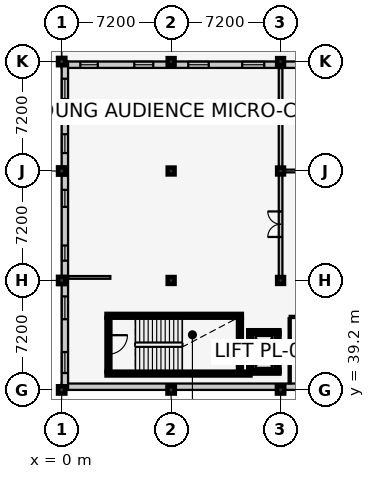
"""IFC4 building model, lengths in metres.
Left out: names, types, materials, properties, quantities, classifications, styles, units other than length and angle.
Written with IfcOpenShell. Run it as: python <this file> out.ifc"""

import sys

from ifc_helpers import new_model, si_unit, direction, frame, frame_2d, origin, origin_2d, place, context, subcontext, project, spatial, rectangle, extrude, element, fill, save


model = new_model("IFC4")
c1 = context("Model", 3, precision=1e-05, world=origin(), true_north=direction((0.0, 1.0)))
c2 = subcontext(c1, "Body", "Model", "MODEL_VIEW")
j1 = project(units=[si_unit("LENGTHUNIT", "METRE"), si_unit("PLANEANGLEUNIT", "RADIAN")], contexts=[c1])
p1 = place(None, origin())
s1 = spatial("IfcSite", under=j1, at=p1, CompositionType="ELEMENT")
p2 = place(p1, origin())
s2 = spatial("IfcBuilding", under=s1, at=p2, CompositionType="ELEMENT")
p3 = place(p2, frame((0.0, 0.0, 13.8)))
s3 = spatial("IfcBuildingStorey", under=s2, at=p3, CompositionType="ELEMENT", Elevation=13.8)
for number, where, z_axis, x_axis in (
    (1, (0.0, 39.2, 0.0), (0.0, 0.0, 1.0), (1.0, 0.0, 0.0)),
    (2, (0.0, 46.4, 0.0), (0.0, 0.0, 1.0), (1.0, 0.0, 0.0)),
    (3, (0.0, 53.6, 0.0), (0.0, 0.0, 1.0), (1.0, 0.0, 0.0)),
    (4, (0.0, 60.8, 0.0), (0.0, 0.0, 1.0), (1.0, 0.0, 0.0)),
    (5, (7.2, 39.2, 0.0), (0.0, 0.0, 1.0), (1.0, 0.0, 0.0)),
):
    element("IfcColumn", number, at=place(p3, frame(where, z_axis=z_axis, x_axis=x_axis)), inside=s3, PredefinedType="COLUMN", context=c2, shape_type="SweptSolid", body=[
        extrude(rectangle(XDim=0.48, YDim=0.48, at=origin_2d()), origin(), (0.0, 0.0, 1.0), 4.2),
    ])
for number, where, z_axis, x_axis in (
    (6, (7.2, 46.4, 0.0), (0.0, 0.0, 1.0), (1.0, 0.0, 0.0)),
    (7, (7.2, 53.6, 0.0), (0.0, 0.0, 1.0), (1.0, 0.0, 0.0)),
    (8, (7.2, 60.8, 0.0), (0.0, 0.0, 1.0), (1.0, 0.0, 0.0)),
):
    element("IfcColumn", number, at=place(p3, frame(where, z_axis=z_axis, x_axis=x_axis)), inside=s3, PredefinedType="COLUMN", context=c2, shape_type="SweptSolid", body=[
        extrude(rectangle(XDim=0.45, YDim=0.45, at=origin_2d()), origin(), (0.0, 0.0, 1.0), 4.2),
    ])
p4 = place(p3, frame((14.4, 39.2, 0.0), z_axis=(0.0, 0.0, 1.0), x_axis=(1.0, 0.0, 0.0)))
e9 = element("IfcColumn", 9, at=p4, inside=s3, PredefinedType="COLUMN", context=c2, shape_type="SweptSolid", body=[
    extrude(rectangle(XDim=0.48, YDim=0.48, at=origin_2d()), origin(), (0.0, 0.0, 1.0), 4.2),
])
for number, where, z_axis, x_axis in (
    (10, (14.4, 46.4, 0.0), (0.0, 0.0, 1.0), (1.0, 0.0, 0.0)),
    (11, (14.4, 53.6, 0.0), (0.0, 0.0, 1.0), (1.0, 0.0, 0.0)),
    (12, (14.4, 60.8, 0.0), (0.0, 0.0, 1.0), (1.0, 0.0, 0.0)),
):
    element("IfcColumn", number, at=place(p3, frame(where, z_axis=z_axis, x_axis=x_axis)), inside=s3, PredefinedType="COLUMN", context=c2, shape_type="SweptSolid", body=[
        extrude(rectangle(XDim=0.45, YDim=0.45, at=origin_2d()), origin(), (0.0, 0.0, 1.0), 4.2),
    ])
p5 = place(p3, frame((28.8, 39.41, 0.0), z_axis=(0.0, 0.0, 1.0), x_axis=(-1.0, 0.0, 0.0)))
e13 = element("IfcWall", 13, at=p5, inside=s3, PredefinedType="SOLIDWALL", context=c2, shape_type="SweptSolid", body=[
    extrude(rectangle(XDim=28.8, YDim=0.42, at=frame_2d((14.4, 0.0))), origin(), (0.0, 0.0, 1.0), 3.245),
])
p6 = place(p3, frame((0.0, 60.59, 0.0), z_axis=(0.0, 0.0, 1.0), x_axis=(1.0, 0.0, 0.0)))
e14 = element("IfcWall", 14, at=p6, inside=s3, PredefinedType="SOLIDWALL", context=c2, shape_type="SweptSolid", body=[
    extrude(rectangle(XDim=28.8, YDim=0.42, at=frame_2d((14.4, 0.0))), origin(), (0.0, 0.0, 1.0), 3.085),
])
p7 = place(p6, frame((1.225, 0.0, 0.9)))
e15 = element("IfcOpeningElement", 15, at=p7, cuts=e14, PredefinedType="OPENING", context=c2, shape_type="SweptSolid", body=[
    extrude(rectangle(XDim=1.15, YDim=1.45, at=frame_2d((0.575, 0.725))), frame((0.0, 0.222, 0.0), z_axis=(0.0, -1.0, 0.0), x_axis=(1.0, 0.0, 0.0)), (0.0, 0.0, 1.0), 0.444),
])
p8 = place(p6, frame((4.775, 0.0, 0.9)))
e16 = element("IfcOpeningElement", 16, at=p8, cuts=e14, PredefinedType="OPENING", context=c2, shape_type="SweptSolid", body=[
    extrude(rectangle(XDim=1.25, YDim=1.45, at=frame_2d((0.625, 0.725))), frame((0.0, 0.222, 0.0), z_axis=(0.0, -1.0, 0.0), x_axis=(1.0, 0.0, 0.0)), (0.0, 0.0, 1.0), 0.444),
])
p9 = place(p6, frame((8.325, 0.0, 0.9)))
e17 = element("IfcOpeningElement", 17, at=p9, cuts=e14, PredefinedType="OPENING", context=c2, shape_type="SweptSolid", body=[
    extrude(rectangle(XDim=1.35, YDim=1.45, at=frame_2d((0.675, 0.725))), frame((0.0, 0.222, 0.0), z_axis=(0.0, -1.0, 0.0), x_axis=(1.0, 0.0, 0.0)), (0.0, 0.0, 1.0), 0.444),
])
p10 = place(p6, frame((11.875, 0.0, 0.9)))
e18 = element("IfcOpeningElement", 18, at=p10, cuts=e14, PredefinedType="OPENING", context=c2, shape_type="SweptSolid", body=[
    extrude(rectangle(XDim=1.45, YDim=1.45, at=frame_2d((0.725, 0.725))), frame((0.0, 0.222, 0.0), z_axis=(0.0, -1.0, 0.0), x_axis=(1.0, 0.0, 0.0)), (0.0, 0.0, 1.0), 0.444),
])
p11 = place(p6, frame((15.75, 0.0, 0.9)))
e19 = element("IfcOpeningElement", 19, at=p11, cuts=e14, PredefinedType="OPENING", context=c2, shape_type="SweptSolid", body=[
    extrude(rectangle(XDim=0.9, YDim=1.6, at=frame_2d((0.45, 0.8))), frame((0.0, 0.222, 0.0), z_axis=(0.0, -1.0, 0.0), x_axis=(1.0, 0.0, 0.0)), (0.0, 0.0, 1.0), 0.444),
])
p12 = place(p6, frame((19.275, 0.0, 0.9)))
e20 = element("IfcOpeningElement", 20, at=p12, cuts=e14, PredefinedType="OPENING", context=c2, shape_type="SweptSolid", body=[
    extrude(rectangle(XDim=1.05, YDim=1.6, at=frame_2d((0.525, 0.8))), frame((0.0, 0.222, 0.0), z_axis=(0.0, -1.0, 0.0), x_axis=(1.0, 0.0, 0.0)), (0.0, 0.0, 1.0), 0.444),
])
p13 = place(p6, frame((22.825, 0.0, 0.9)))
e21 = element("IfcOpeningElement", 21, at=p13, cuts=e14, PredefinedType="OPENING", context=c2, shape_type="SweptSolid", body=[
    extrude(rectangle(XDim=1.15, YDim=1.6, at=frame_2d((0.575, 0.8))), frame((0.0, 0.222, 0.0), z_axis=(0.0, -1.0, 0.0), x_axis=(1.0, 0.0, 0.0)), (0.0, 0.0, 1.0), 0.444),
])
p14 = place(p6, frame((26.375, 0.0, 0.9)))
e22 = element("IfcOpeningElement", 22, at=p14, cuts=e14, PredefinedType="OPENING", context=c2, shape_type="SweptSolid", body=[
    extrude(rectangle(XDim=1.25, YDim=1.6, at=frame_2d((0.625, 0.8))), frame((0.0, 0.222, 0.0), z_axis=(0.0, -1.0, 0.0), x_axis=(1.0, 0.0, 0.0)), (0.0, 0.0, 1.0), 0.444),
])
p15 = place(p3, frame((0.21, 39.2, 0.0), z_axis=(0.0, 0.0, 1.0), x_axis=(0.0, 1.0, 0.0)))
e23 = element("IfcWall", 23, at=p15, inside=s3, PredefinedType="SOLIDWALL", context=c2, shape_type="SweptSolid", body=[
    extrude(rectangle(XDim=21.6, YDim=0.42, at=frame_2d((10.8, 0.0))), origin(), (0.0, 0.0, 1.0), 3.215),
])
p16 = place(p15, frame((1.11, 0.0, 0.9)))
e24 = element("IfcOpeningElement", 24, at=p16, cuts=e23, PredefinedType="OPENING", context=c2, shape_type="SweptSolid", body=[
    extrude(rectangle(XDim=1.38, YDim=1.6, at=frame_2d((0.69, 0.8))), frame((0.0, 0.222, 0.0), z_axis=(0.0, -1.0, 0.0), x_axis=(1.0, 0.0, 0.0)), (0.0, 0.0, 1.0), 0.444),
])
p17 = place(p15, frame((4.65, 0.0, 0.9)))
e25 = element("IfcOpeningElement", 25, at=p17, cuts=e23, PredefinedType="OPENING", context=c2, shape_type="SweptSolid", body=[
    extrude(rectangle(XDim=1.5, YDim=1.6, at=frame_2d((0.75, 0.8))), frame((0.0, 0.222, 0.0), z_axis=(0.0, -1.0, 0.0), x_axis=(1.0, 0.0, 0.0)), (0.0, 0.0, 1.0), 0.444),
])
p18 = place(p15, frame((8.5, 0.0, 0.9)))
e26 = element("IfcOpeningElement", 26, at=p18, cuts=e23, PredefinedType="OPENING", context=c2, shape_type="SweptSolid", body=[
    extrude(rectangle(XDim=1.0, YDim=1.75, at=frame_2d((0.5, 0.875))), frame((0.0, 0.222, 0.0), z_axis=(0.0, -1.0, 0.0), x_axis=(1.0, 0.0, 0.0)), (0.0, 0.0, 1.0), 0.444),
])
p19 = place(p15, frame((12.04, 0.0, 0.9)))
e27 = element("IfcOpeningElement", 27, at=p19, cuts=e23, PredefinedType="OPENING", context=c2, shape_type="SweptSolid", body=[
    extrude(rectangle(XDim=1.12, YDim=1.75, at=frame_2d((0.56, 0.875))), frame((0.0, 0.222, 0.0), z_axis=(0.0, -1.0, 0.0), x_axis=(1.0, 0.0, 0.0)), (0.0, 0.0, 1.0), 0.444),
])
p20 = place(p15, frame((15.58, 0.0, 0.9)))
e28 = element("IfcOpeningElement", 28, at=p20, cuts=e23, PredefinedType="OPENING", context=c2, shape_type="SweptSolid", body=[
    extrude(rectangle(XDim=1.24, YDim=1.75, at=frame_2d((0.62, 0.875))), frame((0.0, 0.222, 0.0), z_axis=(0.0, -1.0, 0.0), x_axis=(1.0, 0.0, 0.0)), (0.0, 0.0, 1.0), 0.444),
])
p21 = place(p15, frame((19.13, 0.0, 0.9)))
e29 = element("IfcOpeningElement", 29, at=p21, cuts=e23, PredefinedType="OPENING", context=c2, shape_type="SweptSolid", body=[
    extrude(rectangle(XDim=1.34, YDim=1.75, at=frame_2d((0.67, 0.875))), frame((0.0, 0.222, 0.0), z_axis=(0.0, -1.0, 0.0), x_axis=(1.0, 0.0, 0.0)), (0.0, 0.0, 1.0), 0.444),
])
p22 = place(p3, frame((2.95, 40.275, 0.0), z_axis=(0.0, 0.0, 1.0), x_axis=(1.0, 0.0, 0.0)))
e30 = element("IfcWall", 30, at=p22, inside=s3, PredefinedType="SHEAR", context=c2, shape_type="SweptSolid", body=[
    extrude(rectangle(XDim=9.47, YDim=0.25, at=frame_2d((4.735, 0.0))), origin(), (0.0, 0.0, 1.0), 3.96),
])
p23 = place(p3, frame((11.85, 44.075, 0.0), z_axis=(0.0, 0.0, 1.0), x_axis=(-1.0, 0.0, 0.0)))
e31 = element("IfcWall", 31, at=p23, inside=s3, PredefinedType="SHEAR", context=c2, shape_type="SweptSolid", body=[
    extrude(rectangle(XDim=8.9, YDim=0.25, at=frame_2d((4.45, 0.0))), origin(), (0.0, 0.0, 1.0), 3.96),
])
p24 = place(p3, frame((3.075, 43.95, 0.0), z_axis=(0.0, 0.0, 1.0), x_axis=(0.0, -1.0, 0.0)))
e32 = element("IfcWall", 32, at=p24, inside=s3, PredefinedType="SHEAR", context=c2, shape_type="SweptSolid", body=[
    extrude(rectangle(XDim=3.55, YDim=0.25, at=frame_2d((1.775, 0.0))), origin(), (0.0, 0.0, 1.0), 3.96),
])
p25 = place(p24, frame((1.15, 0.0, 0.0)))
e33 = element("IfcOpeningElement", 33, at=p25, cuts=e32, PredefinedType="OPENING", context=c2, shape_type="SweptSolid", body=[
    extrude(rectangle(XDim=1.25, YDim=2.15, at=frame_2d((0.625, 1.075))), frame((0.0, 0.137, 0.0), z_axis=(0.0, -1.0, 0.0), x_axis=(1.0, 0.0, 0.0)), (0.0, 0.0, 1.0), 0.274),
])
p26 = place(p3, frame((11.725, 40.4, 0.0), z_axis=(0.0, 0.0, 1.0), x_axis=(0.0, 1.0, 0.0)))
e34 = element("IfcWall", 34, at=p26, inside=s3, PredefinedType="SHEAR", context=c2, shape_type="SweptSolid", body=[
    extrude(rectangle(XDim=3.55, YDim=0.25, at=frame_2d((1.775, 0.0))), origin(), (0.0, 0.0, 1.0), 3.96),
])
p27 = place(p3, frame((12.275, 40.4, 0.0), z_axis=(0.0, 0.0, 1.0), x_axis=(1.0, 0.0, 0.0)))
e35 = element("IfcWall", 35, at=p27, inside=s3, PredefinedType="SHEAR", context=c2, shape_type="SweptSolid", body=[
    extrude(rectangle(XDim=2.05, YDim=0.25, at=frame_2d((1.025, 0.0))), origin(), (0.0, 0.0, 1.0), 3.96),
])
p28 = place(p3, frame((14.325, 43.0, 0.0), z_axis=(0.0, 0.0, 1.0), x_axis=(-1.0, 0.0, 0.0)))
e36 = element("IfcWall", 36, at=p28, inside=s3, PredefinedType="SHEAR", context=c2, shape_type="SweptSolid", body=[
    extrude(rectangle(XDim=2.05, YDim=0.25, at=frame_2d((1.025, 0.0))), origin(), (0.0, 0.0, 1.0), 3.96),
])
p29 = place(p28, frame((0.55, 0.0, 0.0)))
e37 = element("IfcOpeningElement", 37, at=p29, cuts=e36, PredefinedType="OPENING", context=c2, shape_type="SweptSolid", body=[
    extrude(rectangle(XDim=0.95, YDim=2.1, at=frame_2d((0.475, 1.05))), frame((0.0, 0.137, 0.0), z_axis=(0.0, -1.0, 0.0), x_axis=(1.0, 0.0, 0.0)), (0.0, 0.0, 1.0), 0.274),
])
for number, where, z_axis, x_axis in (
    (38, (12.4, 43.0, 0.0), (0.0, 0.0, 1.0), (0.0, -1.0, 0.0)),
    (39, (14.2, 40.4, 0.0), (0.0, 0.0, 1.0), (0.0, 1.0, 0.0)),
):
    element("IfcWall", number, at=place(p3, frame(where, z_axis=z_axis, x_axis=x_axis)), inside=s3, PredefinedType="SHEAR", context=c2, shape_type="SweptSolid", body=[
        extrude(rectangle(XDim=2.6, YDim=0.25, at=frame_2d((1.3, 0.0))), origin(), (0.0, 0.0, 1.0), 3.96),
    ])
p30 = place(p3, frame((0.43, 46.6, 0.0), z_axis=(0.0, 0.0, 1.0), x_axis=(1.0, 0.0, 0.0)))
e40 = element("IfcWall", 40, at=p30, inside=s3, PredefinedType="PARTITIONING", context=c2, shape_type="SweptSolid", body=[
    extrude(rectangle(XDim=2.77, YDim=0.18, at=frame_2d((1.385, 0.0))), origin(), (0.0, 0.0, 1.0), 3.185),
])
p31 = place(p3, frame((14.4, 46.6, 0.0), z_axis=(0.0, 0.0, 1.0), x_axis=(0.0, 1.0, 0.0)))
e41 = element("IfcWall", 41, at=p31, inside=s3, PredefinedType="PARTITIONING", context=c2, shape_type="SweptSolid", body=[
    extrude(rectangle(XDim=13.77, YDim=0.24, at=frame_2d((6.885, 0.0))), origin(), (0.0, 0.0, 1.0), 3.335),
])
p32 = place(p31, frame((2.66, 0.0, 0.0)))
e42 = element("IfcOpeningElement", 42, at=p32, cuts=e41, PredefinedType="OPENING", context=c2, shape_type="SweptSolid", body=[
    extrude(rectangle(XDim=1.68, YDim=2.3, at=frame_2d((0.84, 1.15))), frame((0.0, 0.132, 0.0), z_axis=(0.0, -1.0, 0.0), x_axis=(1.0, 0.0, 0.0)), (0.0, 0.0, 1.0), 0.264),
])
p33 = place(p3, frame((14.53, 53.6, 0.0), z_axis=(0.0, 0.0, 1.0), x_axis=(1.0, 0.0, 0.0)))
e43 = element("IfcWall", 43, at=p33, inside=s3, PredefinedType="PARTITIONING", context=c2, shape_type="SweptSolid", body=[
    extrude(rectangle(XDim=13.84, YDim=0.18, at=frame_2d((6.92, 0.0))), origin(), (0.0, 0.0, 1.0), 3.085),
])
p34 = place(p33, frame((12.47, 0.0, 0.0)))
e44 = element("IfcOpeningElement", 44, at=p34, cuts=e43, PredefinedType="OPENING", context=c2, shape_type="SweptSolid", body=[
    extrude(rectangle(XDim=1.12, YDim=2.15, at=frame_2d((0.56, 1.075))), frame((0.0, 0.102, 0.0), z_axis=(0.0, -1.0, 0.0), x_axis=(1.0, 0.0, 0.0)), (0.0, 0.0, 1.0), 0.204),
])
p35 = place(p3, frame((15.0, 44.0, 0.0), z_axis=(0.0, 0.0, 1.0), x_axis=(1.0, 0.0, 0.0)))
e45 = element("IfcWall", 45, at=p35, inside=s3, PredefinedType="PARTITIONING", context=c2, shape_type="SweptSolid", body=[
    extrude(rectangle(XDim=3.0, YDim=0.14, at=frame_2d((1.5, 0.0))), origin(), (0.0, 0.0, 1.0), 3.96),
])
p36 = place(p35, frame((1.0, 0.0, 0.0)))
e46 = element("IfcOpeningElement", 46, at=p36, cuts=e45, PredefinedType="OPENING", context=c2, shape_type="SweptSolid", body=[
    extrude(rectangle(XDim=1.0, YDim=2.1, at=frame_2d((0.5, 1.05))), frame((0.0, 0.082, 0.0), z_axis=(0.0, -1.0, 0.0), x_axis=(1.0, 0.0, 0.0)), (0.0, 0.0, 1.0), 0.164),
])
p37 = place(p3, frame((15.0, 39.63, 0.0), z_axis=(0.0, 0.0, 1.0), x_axis=(0.0, 1.0, 0.0)))
e47 = element("IfcWall", 47, at=p37, inside=s3, PredefinedType="PARTITIONING", context=c2, shape_type="SweptSolid", body=[
    extrude(rectangle(XDim=4.29, YDim=0.14, at=frame_2d((2.145, 0.0))), origin(), (0.0, 0.0, 1.0), 3.96),
])
p38 = place(p7, origin())
e48 = element("IfcWindow", 48, at=p38, inside=s3, PartitioningType="SINGLE_PANEL", PredefinedType="WINDOW", context=c2, shape_type="SweptSolid", body=[
    extrude(rectangle(XDim=1.15, YDim=1.45, at=frame_2d((0.575, 0.725))), frame((0.0, 0.03, 0.0), z_axis=(0.0, -1.0, 0.0), x_axis=(1.0, 0.0, 0.0)), (0.0, 0.0, 1.0), 0.06),
])
fill(e15, e48)
p39 = place(p8, origin())
e49 = element("IfcWindow", 49, at=p39, inside=s3, PartitioningType="SINGLE_PANEL", PredefinedType="WINDOW", context=c2, shape_type="SweptSolid", body=[
    extrude(rectangle(XDim=1.25, YDim=1.45, at=frame_2d((0.625, 0.725))), frame((0.0, 0.03, 0.0), z_axis=(0.0, -1.0, 0.0), x_axis=(1.0, 0.0, 0.0)), (0.0, 0.0, 1.0), 0.06),
])
fill(e16, e49)
p40 = place(p9, origin())
e50 = element("IfcWindow", 50, at=p40, inside=s3, PartitioningType="SINGLE_PANEL", PredefinedType="WINDOW", context=c2, shape_type="SweptSolid", body=[
    extrude(rectangle(XDim=1.35, YDim=1.45, at=frame_2d((0.675, 0.725))), frame((0.0, 0.03, 0.0), z_axis=(0.0, -1.0, 0.0), x_axis=(1.0, 0.0, 0.0)), (0.0, 0.0, 1.0), 0.06),
])
fill(e17, e50)
p41 = place(p10, origin())
e51 = element("IfcWindow", 51, at=p41, inside=s3, PartitioningType="SINGLE_PANEL", PredefinedType="WINDOW", context=c2, shape_type="SweptSolid", body=[
    extrude(rectangle(XDim=1.45, YDim=1.45, at=frame_2d((0.725, 0.725))), frame((0.0, 0.03, 0.0), z_axis=(0.0, -1.0, 0.0), x_axis=(1.0, 0.0, 0.0)), (0.0, 0.0, 1.0), 0.06),
])
fill(e18, e51)
p42 = place(p16, origin())
e52 = element("IfcWindow", 52, at=p42, inside=s3, PartitioningType="SINGLE_PANEL", PredefinedType="WINDOW", context=c2, shape_type="SweptSolid", body=[
    extrude(rectangle(XDim=1.38, YDim=1.6, at=frame_2d((0.69, 0.8))), frame((0.0, 0.03, 0.0), z_axis=(0.0, -1.0, 0.0), x_axis=(1.0, 0.0, 0.0)), (0.0, 0.0, 1.0), 0.06),
])
fill(e24, e52)
p43 = place(p17, origin())
e53 = element("IfcWindow", 53, at=p43, inside=s3, PartitioningType="SINGLE_PANEL", PredefinedType="WINDOW", context=c2, shape_type="SweptSolid", body=[
    extrude(rectangle(XDim=1.5, YDim=1.6, at=frame_2d((0.75, 0.8))), frame((0.0, 0.03, 0.0), z_axis=(0.0, -1.0, 0.0), x_axis=(1.0, 0.0, 0.0)), (0.0, 0.0, 1.0), 0.06),
])
fill(e25, e53)
p44 = place(p18, origin())
e54 = element("IfcWindow", 54, at=p44, inside=s3, PartitioningType="SINGLE_PANEL", PredefinedType="WINDOW", context=c2, shape_type="SweptSolid", body=[
    extrude(rectangle(XDim=1.0, YDim=1.75, at=frame_2d((0.5, 0.875))), frame((0.0, 0.03, 0.0), z_axis=(0.0, -1.0, 0.0), x_axis=(1.0, 0.0, 0.0)), (0.0, 0.0, 1.0), 0.06),
])
fill(e26, e54)
p45 = place(p19, origin())
e55 = element("IfcWindow", 55, at=p45, inside=s3, PartitioningType="SINGLE_PANEL", PredefinedType="WINDOW", context=c2, shape_type="SweptSolid", body=[
    extrude(rectangle(XDim=1.12, YDim=1.75, at=frame_2d((0.56, 0.875))), frame((0.0, 0.03, 0.0), z_axis=(0.0, -1.0, 0.0), x_axis=(1.0, 0.0, 0.0)), (0.0, 0.0, 1.0), 0.06),
])
fill(e27, e55)
p46 = place(p20, origin())
e56 = element("IfcWindow", 56, at=p46, inside=s3, PartitioningType="SINGLE_PANEL", PredefinedType="WINDOW", context=c2, shape_type="SweptSolid", body=[
    extrude(rectangle(XDim=1.24, YDim=1.75, at=frame_2d((0.62, 0.875))), frame((0.0, 0.03, 0.0), z_axis=(0.0, -1.0, 0.0), x_axis=(1.0, 0.0, 0.0)), (0.0, 0.0, 1.0), 0.06),
])
fill(e28, e56)
p47 = place(p21, origin())
e57 = element("IfcWindow", 57, at=p47, inside=s3, PartitioningType="SINGLE_PANEL", PredefinedType="WINDOW", context=c2, shape_type="SweptSolid", body=[
    extrude(rectangle(XDim=1.34, YDim=1.75, at=frame_2d((0.67, 0.875))), frame((0.0, 0.03, 0.0), z_axis=(0.0, -1.0, 0.0), x_axis=(1.0, 0.0, 0.0)), (0.0, 0.0, 1.0), 0.06),
])
fill(e29, e57)
p48 = place(p25, origin())
e58 = element("IfcDoor", 58, at=p48, inside=s3, OperationType="SINGLE_SWING_LEFT", PredefinedType="DOOR", context=c2, shape_type="SweptSolid", body=[
    extrude(rectangle(XDim=1.25, YDim=2.15, at=frame_2d((0.625, 1.075))), frame((0.0, 0.025, 0.0), z_axis=(0.0, -1.0, 0.0), x_axis=(1.0, 0.0, 0.0)), (0.0, 0.0, 1.0), 0.05),
])
fill(e33, e58)
p49 = place(p29, origin())
e59 = element("IfcDoor", 59, at=p49, inside=s3, OperationType="SLIDING_TO_LEFT", PredefinedType="DOOR", context=c2, shape_type="SweptSolid", body=[
    extrude(rectangle(XDim=0.95, YDim=2.1, at=frame_2d((0.475, 1.05))), frame((0.0, 0.025, 0.0), z_axis=(0.0, -1.0, 0.0), x_axis=(1.0, 0.0, 0.0)), (0.0, 0.0, 1.0), 0.05),
])
fill(e37, e59)
p50 = place(p32, origin())
e60 = element("IfcDoor", 60, at=p50, inside=s3, OperationType="DOUBLE_DOOR_SINGLE_SWING", PredefinedType="DOOR", context=c2, shape_type="SweptSolid", body=[
    extrude(rectangle(XDim=1.68, YDim=2.3, at=frame_2d((0.84, 1.15))), frame((0.0, 0.025, 0.0), z_axis=(0.0, -1.0, 0.0), x_axis=(1.0, 0.0, 0.0)), (0.0, 0.0, 1.0), 0.05),
])
fill(e42, e60)
save(model, sys.argv[1])
